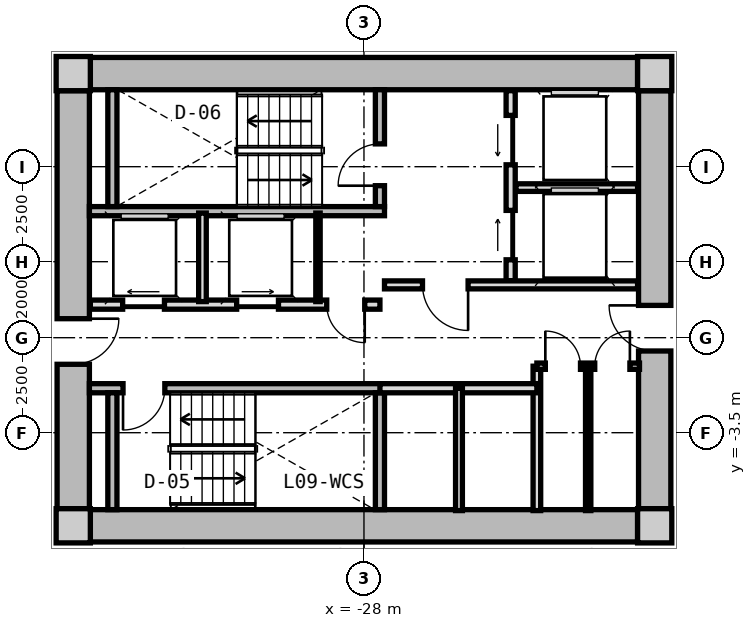
"""IFC4 building model, lengths in metres.
Left out: names, types, materials, properties, quantities, classifications, styles, units other than length and angle.
Written with IfcOpenShell. Run it as: python <this file> out.ifc"""

import sys

from ifc_helpers import new_model, si_unit, direction, frame, frame_2d, origin, origin_2d, place, context, subcontext, project, spatial, rectangle, extrude, source, transform, mapped, element, fill, save


model = new_model("IFC4")
c1 = context("Model", 3, precision=1e-05, world=origin(), true_north=direction((0.0, 1.0)))
c2 = subcontext(c1, "Body", "Model", "MODEL_VIEW")
j1 = project(units=[si_unit("LENGTHUNIT", "METRE"), si_unit("PLANEANGLEUNIT", "RADIAN")], contexts=[c1])
p1 = place(None, origin())
s1 = spatial("IfcSite", under=j1, at=p1, CompositionType="ELEMENT")
p2 = place(p1, origin())
s2 = spatial("IfcBuilding", under=s1, at=p2, CompositionType="ELEMENT")
p3 = place(p2, frame((0.0, 0.0, 33.8)))
s3 = spatial("IfcBuildingStorey", under=s2, at=p3, CompositionType="ELEMENT", Elevation=33.8)
m1 = source(origin(), c2, "Body", "SweptSolid", [
    extrude(rectangle(XDim=0.9, YDim=0.9, at=origin_2d()), origin(), (0.0, 0.0, 1.0), 3.05),
])
for number, where, z_axis, x_axis in (
    (1, (-35.65, -5.95, 0.0), (0.0, 0.0, 1.0), (1.0, 0.0, 0.0)),
    (2, (-20.35, -5.95, 0.0), (0.0, 0.0, 1.0), (1.0, 0.0, 0.0)),
    (3, (-20.35, 5.95, 0.0), (0.0, 0.0, 1.0), (1.0, 0.0, 0.0)),
    (4, (-35.65, 5.95, 0.0), (0.0, 0.0, 1.0), (1.0, 0.0, 0.0)),
):
    element("IfcColumn", number, at=place(p3, frame(where, z_axis=z_axis, x_axis=x_axis)), inside=s3, PredefinedType="COLUMN", context=c2, shape_type="MappedRepresentation", body=[
        mapped(m1, transform((0.0, 0.0, 0.0), x_axis=(1.0, 0.0, 0.0), y_axis=(0.0, 1.0, 0.0), z_axis=(0.0, 0.0, 1.0), scale=1.0)),
    ])
m2 = source(origin(), c2, "Body", "SweptSolid", [
    extrude(rectangle(XDim=14.4, YDim=0.85, at=frame_2d((7.2, 0.0))), origin(), (0.0, 0.0, 1.0), 2.79),
])
for number, where, z_axis, x_axis in (
    (5, (-35.2, 5.95, 0.0), (0.0, 0.0, 1.0), (1.0, 0.0, 0.0)),
    (6, (-20.8, -5.95, 0.0), (0.0, 0.0, 1.0), (-1.0, 0.0, 0.0)),
):
    element("IfcWall", number, at=place(p3, frame(where, z_axis=z_axis, x_axis=x_axis)), inside=s3, PredefinedType="SHEAR", context=c2, shape_type="MappedRepresentation", body=[
        mapped(m2, transform((0.0, 0.0, 0.0), x_axis=(1.0, 0.0, 0.0), y_axis=(0.0, 1.0, 0.0), z_axis=(0.0, 0.0, 1.0), scale=1.0)),
    ])
m3 = source(origin(), c2, "Body", "SweptSolid", [
    extrude(rectangle(XDim=11.0, YDim=0.85, at=frame_2d((5.5, 0.0))), origin(), (0.0, 0.0, 1.0), 2.79),
])
p4 = place(p3, frame((-35.65, -5.5, 0.0), z_axis=(0.0, 0.0, 1.0), x_axis=(0.0, 1.0, 0.0)))
e7 = element("IfcWall", 7, at=p4, inside=s3, PredefinedType="SHEAR", context=c2, shape_type="MappedRepresentation", body=[
    mapped(m3, transform((0.0, 0.0, 0.0), x_axis=(1.0, 0.0, 0.0), y_axis=(0.0, 1.0, 0.0), z_axis=(0.0, 0.0, 1.0), scale=1.0)),
])
p5 = place(p4, frame((3.8, 0.0, 0.0)))
e8 = element("IfcOpeningElement", 8, at=p5, cuts=e7, PredefinedType="OPENING", context=c2, shape_type="SweptSolid", body=[
    extrude(rectangle(XDim=1.2, YDim=2.15, at=frame_2d((0.6, 1.075))), frame((0.0, 0.435, 0.0), z_axis=(0.0, -1.0, 0.0), x_axis=(1.0, 0.0, 0.0)), (0.0, 0.0, 1.0), 0.87),
])
p6 = place(p3, frame((-20.35, 5.5, 0.0), z_axis=(0.0, 0.0, 1.0), x_axis=(0.0, -1.0, 0.0)))
e9 = element("IfcWall", 9, at=p6, inside=s3, PredefinedType="SHEAR", context=c2, shape_type="MappedRepresentation", body=[
    mapped(m3, transform((0.0, 0.0, 0.0), x_axis=(1.0, 0.0, 0.0), y_axis=(0.0, 1.0, 0.0), z_axis=(0.0, 0.0, 1.0), scale=1.0)),
])
p7 = place(p6, frame((5.65, 0.0, 0.0)))
e10 = element("IfcOpeningElement", 10, at=p7, cuts=e9, PredefinedType="OPENING", context=c2, shape_type="SweptSolid", body=[
    extrude(rectangle(XDim=1.2, YDim=2.15, at=frame_2d((0.6, 1.075))), frame((0.0, 0.435, 0.0), z_axis=(0.0, -1.0, 0.0), x_axis=(1.0, 0.0, 0.0)), (0.0, 0.0, 1.0), 0.87),
])
m4 = source(origin(), c2, "Body", "SweptSolid", [
    extrude(rectangle(XDim=7.765, YDim=0.24, at=frame_2d((3.883, 0.0))), origin(), (0.0, 0.0, 1.0), 2.79),
])
p8 = place(p3, frame((-35.225, 2.33, 0.0), z_axis=(0.0, 0.0, 1.0), x_axis=(1.0, 0.0, 0.0)))
e11 = element("IfcWall", 11, at=p8, inside=s3, PredefinedType="PARTITIONING", context=c2, shape_type="MappedRepresentation", body=[
    mapped(m4, transform((0.0, 0.0, 0.0), x_axis=(1.0, 0.0, 0.0), y_axis=(0.0, 1.0, 0.0), z_axis=(0.0, 0.0, 1.0), scale=1.0)),
])
m5 = source(origin(), c2, "Body", "SweptSolid", [
    extrude(rectangle(XDim=3.075, YDim=0.24, at=frame_2d((1.538, 0.0))), origin(), (0.0, 0.0, 1.0), 2.79),
])
p9 = place(p3, frame((-34.62, 2.45, 0.0), z_axis=(0.0, 0.0, 1.0), x_axis=(0.0, 1.0, 0.0)))
e12 = element("IfcWall", 12, at=p9, inside=s3, PredefinedType="PARTITIONING", context=c2, shape_type="MappedRepresentation", body=[
    mapped(m5, transform((0.0, 0.0, 0.0), x_axis=(1.0, 0.0, 0.0), y_axis=(0.0, 1.0, 0.0), z_axis=(0.0, 0.0, 1.0), scale=1.0)),
])
p10 = place(p3, frame((-27.58, 2.45, 0.0), z_axis=(0.0, 0.0, 1.0), x_axis=(0.0, 1.0, 0.0)))
e13 = element("IfcWall", 13, at=p10, inside=s3, PredefinedType="PARTITIONING", context=c2, shape_type="MappedRepresentation", body=[
    mapped(m5, transform((0.0, 0.0, 0.0), x_axis=(1.0, 0.0, 0.0), y_axis=(0.0, 1.0, 0.0), z_axis=(0.0, 0.0, 1.0), scale=1.0)),
])
p11 = place(p10, frame((0.55, 0.0, 0.0)))
e14 = element("IfcOpeningElement", 14, at=p11, cuts=e13, PredefinedType="OPENING", context=c2, shape_type="SweptSolid", body=[
    extrude(rectangle(XDim=1.1, YDim=2.15, at=frame_2d((0.55, 1.075))), frame((0.0, 0.13, 0.0), z_axis=(0.0, -1.0, 0.0), x_axis=(1.0, 0.0, 0.0)), (0.0, 0.0, 1.0), 0.26),
])
p12 = place(p3, frame((-35.225, -2.33, 0.0), z_axis=(0.0, 0.0, 1.0), x_axis=(1.0, 0.0, 0.0)))
e15 = element("IfcWall", 15, at=p12, inside=s3, PredefinedType="PARTITIONING", context=c2, shape_type="MappedRepresentation", body=[
    mapped(m4, transform((0.0, 0.0, 0.0), x_axis=(1.0, 0.0, 0.0), y_axis=(0.0, 1.0, 0.0), z_axis=(0.0, 0.0, 1.0), scale=1.0)),
])
p13 = place(p12, frame((0.885, 0.0, 0.0)))
e16 = element("IfcOpeningElement", 16, at=p13, cuts=e15, PredefinedType="OPENING", context=c2, shape_type="SweptSolid", body=[
    extrude(rectangle(XDim=1.1, YDim=2.15, at=frame_2d((0.55, 1.075))), frame((0.0, 0.13, 0.0), z_axis=(0.0, -1.0, 0.0), x_axis=(1.0, 0.0, 0.0)), (0.0, 0.0, 1.0), 0.26),
])
for number, where, z_axis, x_axis in (
    (17, (-34.62, -5.525, 0.0), (0.0, 0.0, 1.0), (0.0, 1.0, 0.0)),
    (18, (-27.58, -5.525, 0.0), (0.0, 0.0, 1.0), (0.0, 1.0, 0.0)),
):
    element("IfcWall", number, at=place(p3, frame(where, z_axis=z_axis, x_axis=x_axis)), inside=s3, PredefinedType="PARTITIONING", context=c2, shape_type="MappedRepresentation", body=[
        mapped(m5, transform((0.0, 0.0, 0.0), x_axis=(1.0, 0.0, 0.0), y_axis=(0.0, 1.0, 0.0), z_axis=(0.0, 0.0, 1.0), scale=1.0)),
    ])
m6 = source(origin(), c2, "Body", "SweptSolid", [
    extrude(rectangle(XDim=5.0, YDim=0.24, at=frame_2d((2.5, 0.0))), origin(), (0.0, 0.0, 1.0), 2.775),
])
p14 = place(p3, frame((-24.14, 0.5, 0.0), z_axis=(0.0, 0.0, 1.0), x_axis=(0.0, 1.0, 0.0)))
e19 = element("IfcWall", 19, at=p14, inside=s3, PredefinedType="PARTITIONING", context=c2, shape_type="MappedRepresentation", body=[
    mapped(m6, transform((0.0, 0.0, 0.0), x_axis=(1.0, 0.0, 0.0), y_axis=(0.0, 1.0, 0.0), z_axis=(0.0, 0.0, 1.0), scale=1.0)),
])
p15 = place(p14, frame((3.05, 0.0, 0.0)))
e20 = element("IfcOpeningElement", 20, at=p15, cuts=e19, PredefinedType="OPENING", context=c2, shape_type="SweptSolid", body=[
    extrude(rectangle(XDim=1.3, YDim=2.2, at=frame_2d((0.65, 1.1))), frame((0.0, 0.13, 0.0), z_axis=(0.0, -1.0, 0.0), x_axis=(1.0, 0.0, 0.0)), (0.0, 0.0, 1.0), 0.26),
])
p16 = place(p14, frame((0.55, 0.0, 0.0)))
e21 = element("IfcOpeningElement", 21, at=p16, cuts=e19, PredefinedType="OPENING", context=c2, shape_type="SweptSolid", body=[
    extrude(rectangle(XDim=1.3, YDim=2.2, at=frame_2d((0.65, 1.1))), frame((0.0, 0.13, 0.0), z_axis=(0.0, -1.0, 0.0), x_axis=(1.0, 0.0, 0.0)), (0.0, 0.0, 1.0), 0.26),
])
m7 = source(origin(), c2, "Body", "SweptSolid", [
    extrude(rectangle(XDim=3.2, YDim=0.2, at=frame_2d((1.6, 0.0))), origin(), (0.0, 0.0, 1.0), 2.775),
])
p17 = place(p3, frame((-24.0, 2.95, 0.0), z_axis=(0.0, 0.0, 1.0), x_axis=(1.0, 0.0, 0.0)))
e22 = element("IfcWall", 22, at=p17, inside=s3, PredefinedType="PARTITIONING", context=c2, shape_type="MappedRepresentation", body=[
    mapped(m7, transform((0.0, 0.0, 0.0), x_axis=(1.0, 0.0, 0.0), y_axis=(0.0, 1.0, 0.0), z_axis=(0.0, 0.0, 1.0), scale=1.0)),
])
m8 = source(origin(), c2, "Body", "SweptSolid", [
    extrude(rectangle(XDim=6.66, YDim=0.21, at=frame_2d((3.33, 0.0))), origin(), (0.0, 0.0, 1.0), 2.775),
])
p18 = place(p3, frame((-27.46, 0.39, 0.0), z_axis=(0.0, 0.0, 1.0), x_axis=(1.0, 0.0, 0.0)))
e23 = element("IfcWall", 23, at=p18, inside=s3, PredefinedType="PARTITIONING", context=c2, shape_type="MappedRepresentation", body=[
    mapped(m8, transform((0.0, 0.0, 0.0), x_axis=(1.0, 0.0, 0.0), y_axis=(0.0, 1.0, 0.0), z_axis=(0.0, 0.0, 1.0), scale=1.0)),
])
p19 = place(p18, frame((1.0, 0.0, 0.0)))
e24 = element("IfcOpeningElement", 24, at=p19, cuts=e23, PredefinedType="OPENING", context=c2, shape_type="SweptSolid", body=[
    extrude(rectangle(XDim=1.2, YDim=2.15, at=frame_2d((0.6, 1.075))), frame((0.0, 0.115, 0.0), z_axis=(0.0, -1.0, 0.0), x_axis=(1.0, 0.0, 0.0)), (0.0, 0.0, 1.0), 0.23),
])
m9 = source(origin(), c2, "Body", "SweptSolid", [
    extrude(rectangle(XDim=7.62, YDim=0.24, at=frame_2d((3.81, 0.0))), origin(), (0.0, 0.0, 1.0), 2.775),
])
p20 = place(p3, frame((-35.2, -0.13, 0.0), z_axis=(0.0, 0.0, 1.0), x_axis=(1.0, 0.0, 0.0)))
e25 = element("IfcWall", 25, at=p20, inside=s3, PredefinedType="PARTITIONING", context=c2, shape_type="MappedRepresentation", body=[
    mapped(m9, transform((0.0, 0.0, 0.0), x_axis=(1.0, 0.0, 0.0), y_axis=(0.0, 1.0, 0.0), z_axis=(0.0, 0.0, 1.0), scale=1.0)),
])
p21 = place(p20, frame((6.22, 0.0, 0.0)))
e26 = element("IfcOpeningElement", 26, at=p21, cuts=e25, PredefinedType="OPENING", context=c2, shape_type="SweptSolid", body=[
    extrude(rectangle(XDim=1.0, YDim=2.1, at=frame_2d((0.5, 1.05))), frame((0.0, 0.13, 0.0), z_axis=(0.0, -1.0, 0.0), x_axis=(1.0, 0.0, 0.0)), (0.0, 0.0, 1.0), 0.26),
])
p22 = place(p20, frame((0.85, 0.0, 0.0)))
e27 = element("IfcOpeningElement", 27, at=p22, cuts=e25, PredefinedType="OPENING", context=c2, shape_type="SweptSolid", body=[
    extrude(rectangle(XDim=1.1, YDim=2.2, at=frame_2d((0.55, 1.1))), frame((0.0, 0.13, 0.0), z_axis=(0.0, -1.0, 0.0), x_axis=(1.0, 0.0, 0.0)), (0.0, 0.0, 1.0), 0.26),
])
p23 = place(p20, frame((3.85, 0.0, 0.0)))
e28 = element("IfcOpeningElement", 28, at=p23, cuts=e25, PredefinedType="OPENING", context=c2, shape_type="SweptSolid", body=[
    extrude(rectangle(XDim=1.1, YDim=2.2, at=frame_2d((0.55, 1.1))), frame((0.0, 0.13, 0.0), z_axis=(0.0, -1.0, 0.0), x_axis=(1.0, 0.0, 0.0)), (0.0, 0.0, 1.0), 0.26),
])
m10 = source(origin(), c2, "Body", "SweptSolid", [
    extrude(rectangle(XDim=2.33, YDim=0.115, at=frame_2d((1.165, 0.0))), origin(), (0.0, 0.0, 1.0), 2.775),
])
p24 = place(p3, frame((-29.21, -0.05, 0.0), z_axis=(0.0, 0.0, 1.0), x_axis=(0.0, 1.0, 0.0)))
e29 = element("IfcWall", 29, at=p24, inside=s3, PredefinedType="PARTITIONING", context=c2, shape_type="MappedRepresentation", body=[
    mapped(m10, transform((0.0, 0.0, 0.0), x_axis=(1.0, 0.0, 0.0), y_axis=(0.0, 1.0, 0.0), z_axis=(0.0, 0.0, 1.0), scale=1.0)),
])
m11 = source(origin(), c2, "Body", "SweptSolid", [
    extrude(rectangle(XDim=2.33, YDim=0.2, at=frame_2d((1.165, 0.0))), origin(), (0.0, 0.0, 1.0), 2.775),
])
p25 = place(p3, frame((-32.25, -0.05, 0.0), z_axis=(0.0, 0.0, 1.0), x_axis=(0.0, 1.0, 0.0)))
e30 = element("IfcWall", 30, at=p25, inside=s3, PredefinedType="PARTITIONING", context=c2, shape_type="MappedRepresentation", body=[
    mapped(m11, transform((0.0, 0.0, 0.0), x_axis=(1.0, 0.0, 0.0), y_axis=(0.0, 1.0, 0.0), z_axis=(0.0, 0.0, 1.0), scale=1.0)),
])
m12 = source(origin(), c2, "Body", "SweptSolid", [
    extrude(rectangle(XDim=3.8, YDim=0.2, at=frame_2d((1.9, 0.0))), origin(), (0.0, 0.0, 1.0), 2.775),
])
p26 = place(p3, frame((-23.45, -5.55, 0.0), z_axis=(0.0, 0.0, 1.0), x_axis=(0.0, 1.0, 0.0)))
e31 = element("IfcWall", 31, at=p26, inside=s3, PredefinedType="PARTITIONING", context=c2, shape_type="MappedRepresentation", body=[
    mapped(m12, transform((0.0, 0.0, 0.0), x_axis=(1.0, 0.0, 0.0), y_axis=(0.0, 1.0, 0.0), z_axis=(0.0, 0.0, 1.0), scale=1.0)),
])
m13 = source(origin(), c2, "Body", "SweptSolid", [
    extrude(rectangle(XDim=4.13, YDim=0.24, at=frame_2d((2.065, 0.0))), origin(), (0.0, 0.0, 1.0), 2.775),
])
p27 = place(p3, frame((-27.58, -2.33, 0.0), z_axis=(0.0, 0.0, 1.0), x_axis=(1.0, 0.0, 0.0)))
e32 = element("IfcWall", 32, at=p27, inside=s3, PredefinedType="PARTITIONING", context=c2, shape_type="MappedRepresentation", body=[
    mapped(m13, transform((0.0, 0.0, 0.0), x_axis=(1.0, 0.0, 0.0), y_axis=(0.0, 1.0, 0.0), z_axis=(0.0, 0.0, 1.0), scale=1.0)),
])
m14 = source(origin(), c2, "Body", "SweptSolid", [
    extrude(rectangle(XDim=3.22, YDim=0.18, at=frame_2d((1.61, 0.0))), origin(), (0.0, 0.0, 1.0), 2.775),
])
p28 = place(p3, frame((-25.5, -5.55, 0.0), z_axis=(0.0, 0.0, 1.0), x_axis=(0.0, 1.0, 0.0)))
e33 = element("IfcWall", 33, at=p28, inside=s3, PredefinedType="PARTITIONING", context=c2, shape_type="MappedRepresentation", body=[
    mapped(m14, transform((0.0, 0.0, 0.0), x_axis=(1.0, 0.0, 0.0), y_axis=(0.0, 1.0, 0.0), z_axis=(0.0, 0.0, 1.0), scale=1.0)),
])
m15 = source(origin(), c2, "Body", "SweptSolid", [
    extrude(rectangle(XDim=2.7, YDim=0.165, at=frame_2d((1.35, 0.0))), origin(), (0.0, 0.0, 1.0), 2.775),
])
p29 = place(p3, frame((-23.45, -1.75, 0.0), z_axis=(0.0, 0.0, 1.0), x_axis=(1.0, 0.0, 0.0)))
e34 = element("IfcWall", 34, at=p29, inside=s3, PredefinedType="PARTITIONING", context=c2, shape_type="MappedRepresentation", body=[
    mapped(m15, transform((0.0, 0.0, 0.0), x_axis=(1.0, 0.0, 0.0), y_axis=(0.0, 1.0, 0.0), z_axis=(0.0, 0.0, 1.0), scale=1.0)),
])
p30 = place(p29, frame((0.222, 0.0, 0.0)))
e35 = element("IfcOpeningElement", 35, at=p30, cuts=e34, PredefinedType="OPENING", context=c2, shape_type="SweptSolid", body=[
    extrude(rectangle(XDim=0.925, YDim=2.1, at=frame_2d((0.462, 1.05))), frame((0.0, 0.093, 0.0), z_axis=(0.0, -1.0, 0.0), x_axis=(1.0, 0.0, 0.0)), (0.0, 0.0, 1.0), 0.185),
])
p31 = place(p29, frame((1.522, 0.0, 0.0)))
e36 = element("IfcOpeningElement", 36, at=p31, cuts=e34, PredefinedType="OPENING", context=c2, shape_type="SweptSolid", body=[
    extrude(rectangle(XDim=0.925, YDim=2.1, at=frame_2d((0.462, 1.05))), frame((0.0, 0.093, 0.0), z_axis=(0.0, -1.0, 0.0), x_axis=(1.0, 0.0, 0.0)), (0.0, 0.0, 1.0), 0.185),
])
m16 = source(origin(), c2, "Body", "SweptSolid", [
    extrude(rectangle(XDim=3.8, YDim=0.14, at=frame_2d((1.9, 0.0))), origin(), (0.0, 0.0, 1.0), 2.775),
])
p32 = place(p3, frame((-22.1, -5.55, 0.0), z_axis=(0.0, 0.0, 1.0), x_axis=(0.0, 1.0, 0.0)))
e37 = element("IfcWall", 37, at=p32, inside=s3, PredefinedType="PARTITIONING", context=c2, shape_type="MappedRepresentation", body=[
    mapped(m16, transform((0.0, 0.0, 0.0), x_axis=(1.0, 0.0, 0.0), y_axis=(0.0, 1.0, 0.0), z_axis=(0.0, 0.0, 1.0), scale=1.0)),
])
m17 = source(origin(), c2, "Body", "SweptSolid", [
    extrude(rectangle(XDim=1.1, YDim=2.15, at=frame_2d((0.55, 1.075))), frame((0.0, 0.025, 0.0), z_axis=(0.0, -1.0, 0.0), x_axis=(1.0, 0.0, 0.0)), (0.0, 0.0, 1.0), 0.05),
])
p33 = place(p11, origin())
e38 = element("IfcDoor", 38, at=p33, inside=s3, OperationType="SINGLE_SWING_LEFT", PredefinedType="DOOR", context=c2, shape_type="MappedRepresentation", body=[
    mapped(m17, transform((0.0, 0.0, 0.0), x_axis=(1.0, 0.0, 0.0), y_axis=(0.0, 1.0, 0.0), z_axis=(0.0, 0.0, 1.0), scale=1.0)),
])
fill(e14, e38)
p34 = place(p13, frame((1.1, 0.0, 0.0), z_axis=(0.0, 0.0, 1.0), x_axis=(-1.0, 0.0, 0.0)))
e39 = element("IfcDoor", 39, at=p34, inside=s3, OperationType="SINGLE_SWING_RIGHT", PredefinedType="DOOR", context=c2, shape_type="MappedRepresentation", body=[
    mapped(m17, transform((0.0, 0.0, 0.0), x_axis=(1.0, 0.0, 0.0), y_axis=(0.0, 1.0, 0.0), z_axis=(0.0, 0.0, 1.0), scale=1.0)),
])
fill(e16, e39)
m18 = source(origin(), c2, "Body", "SweptSolid", [
    extrude(rectangle(XDim=1.3, YDim=2.2, at=frame_2d((0.65, 1.1))), frame((0.0, 0.025, 0.0), z_axis=(0.0, -1.0, 0.0), x_axis=(1.0, 0.0, 0.0)), (0.0, 0.0, 1.0), 0.05),
])
p35 = place(p15, origin())
e40 = element("IfcDoor", 40, at=p35, inside=s3, OperationType="SLIDING_TO_LEFT", PredefinedType="DOOR", context=c2, shape_type="MappedRepresentation", body=[
    mapped(m18, transform((0.0, 0.0, 0.0), x_axis=(1.0, 0.0, 0.0), y_axis=(0.0, 1.0, 0.0), z_axis=(0.0, 0.0, 1.0), scale=1.0)),
])
fill(e20, e40)
p36 = place(p16, origin())
e41 = element("IfcDoor", 41, at=p36, inside=s3, OperationType="SLIDING_TO_RIGHT", PredefinedType="DOOR", context=c2, shape_type="MappedRepresentation", body=[
    mapped(m18, transform((0.0, 0.0, 0.0), x_axis=(1.0, 0.0, 0.0), y_axis=(0.0, 1.0, 0.0), z_axis=(0.0, 0.0, 1.0), scale=1.0)),
])
fill(e21, e41)
m19 = source(origin(), c2, "Body", "SweptSolid", [
    extrude(rectangle(XDim=1.2, YDim=2.15, at=frame_2d((0.6, 1.075))), frame((0.0, 0.025, 0.0), z_axis=(0.0, -1.0, 0.0), x_axis=(1.0, 0.0, 0.0)), (0.0, 0.0, 1.0), 0.05),
])
p37 = place(p19, frame((1.2, 0.0, 0.0), z_axis=(0.0, 0.0, 1.0), x_axis=(-1.0, 0.0, 0.0)))
e42 = element("IfcDoor", 42, at=p37, inside=s3, OperationType="SINGLE_SWING_LEFT", PredefinedType="DOOR", context=c2, shape_type="MappedRepresentation", body=[
    mapped(m19, transform((0.0, 0.0, 0.0), x_axis=(1.0, 0.0, 0.0), y_axis=(0.0, 1.0, 0.0), z_axis=(0.0, 0.0, 1.0), scale=1.0)),
])
fill(e24, e42)
p38 = place(p5, frame((1.2, 0.0, 0.0), z_axis=(0.0, 0.0, 1.0), x_axis=(-1.0, 0.0, 0.0)))
e43 = element("IfcDoor", 43, at=p38, inside=s3, OperationType="SINGLE_SWING_LEFT", PredefinedType="DOOR", context=c2, shape_type="MappedRepresentation", body=[
    mapped(m19, transform((0.0, 0.0, 0.0), x_axis=(1.0, 0.0, 0.0), y_axis=(0.0, 1.0, 0.0), z_axis=(0.0, 0.0, 1.0), scale=1.0)),
])
fill(e8, e43)
p39 = place(p7, frame((1.2, 0.0, 0.0), z_axis=(0.0, 0.0, 1.0), x_axis=(-1.0, 0.0, 0.0)))
e44 = element("IfcDoor", 44, at=p39, inside=s3, OperationType="SINGLE_SWING_RIGHT", PredefinedType="DOOR", context=c2, shape_type="MappedRepresentation", body=[
    mapped(m19, transform((0.0, 0.0, 0.0), x_axis=(1.0, 0.0, 0.0), y_axis=(0.0, 1.0, 0.0), z_axis=(0.0, 0.0, 1.0), scale=1.0)),
])
fill(e10, e44)
m20 = source(origin(), c2, "Body", "SweptSolid", [
    extrude(rectangle(XDim=1.0, YDim=2.1, at=frame_2d((0.5, 1.05))), frame((0.0, 0.025, 0.0), z_axis=(0.0, -1.0, 0.0), x_axis=(1.0, 0.0, 0.0)), (0.0, 0.0, 1.0), 0.05),
])
p40 = place(p21, frame((1.0, 0.0, 0.0), z_axis=(0.0, 0.0, 1.0), x_axis=(-1.0, 0.0, 0.0)))
e45 = element("IfcDoor", 45, at=p40, inside=s3, OperationType="SINGLE_SWING_LEFT", PredefinedType="DOOR", context=c2, shape_type="MappedRepresentation", body=[
    mapped(m20, transform((0.0, 0.0, 0.0), x_axis=(1.0, 0.0, 0.0), y_axis=(0.0, 1.0, 0.0), z_axis=(0.0, 0.0, 1.0), scale=1.0)),
])
fill(e26, e45)
m21 = source(origin(), c2, "Body", "SweptSolid", [
    extrude(rectangle(XDim=1.1, YDim=2.2, at=frame_2d((0.55, 1.1))), frame((0.0, 0.025, 0.0), z_axis=(0.0, -1.0, 0.0), x_axis=(1.0, 0.0, 0.0)), (0.0, 0.0, 1.0), 0.05),
])
p41 = place(p22, origin())
e46 = element("IfcDoor", 46, at=p41, inside=s3, OperationType="SLIDING_TO_LEFT", PredefinedType="DOOR", context=c2, shape_type="MappedRepresentation", body=[
    mapped(m21, transform((0.0, 0.0, 0.0), x_axis=(1.0, 0.0, 0.0), y_axis=(0.0, 1.0, 0.0), z_axis=(0.0, 0.0, 1.0), scale=1.0)),
])
fill(e27, e46)
p42 = place(p23, origin())
e47 = element("IfcDoor", 47, at=p42, inside=s3, OperationType="SLIDING_TO_RIGHT", PredefinedType="DOOR", context=c2, shape_type="MappedRepresentation", body=[
    mapped(m21, transform((0.0, 0.0, 0.0), x_axis=(1.0, 0.0, 0.0), y_axis=(0.0, 1.0, 0.0), z_axis=(0.0, 0.0, 1.0), scale=1.0)),
])
fill(e28, e47)
m22 = source(origin(), c2, "Body", "SweptSolid", [
    extrude(rectangle(XDim=0.925, YDim=2.1, at=frame_2d((0.462, 1.05))), frame((0.0, 0.025, 0.0), z_axis=(0.0, -1.0, 0.0), x_axis=(1.0, 0.0, 0.0)), (0.0, 0.0, 1.0), 0.05),
])
p43 = place(p30, origin())
e48 = element("IfcDoor", 48, at=p43, inside=s3, OperationType="SINGLE_SWING_LEFT", PredefinedType="DOOR", context=c2, shape_type="MappedRepresentation", body=[
    mapped(m22, transform((0.0, 0.0, 0.0), x_axis=(1.0, 0.0, 0.0), y_axis=(0.0, 1.0, 0.0), z_axis=(0.0, 0.0, 1.0), scale=1.0)),
])
fill(e35, e48)
p44 = place(p31, origin())
e49 = element("IfcDoor", 49, at=p44, inside=s3, OperationType="SINGLE_SWING_RIGHT", PredefinedType="DOOR", context=c2, shape_type="MappedRepresentation", body=[
    mapped(m22, transform((0.0, 0.0, 0.0), x_axis=(1.0, 0.0, 0.0), y_axis=(0.0, 1.0, 0.0), z_axis=(0.0, 0.0, 1.0), scale=1.0)),
])
fill(e36, e49)
save(model, sys.argv[1])
